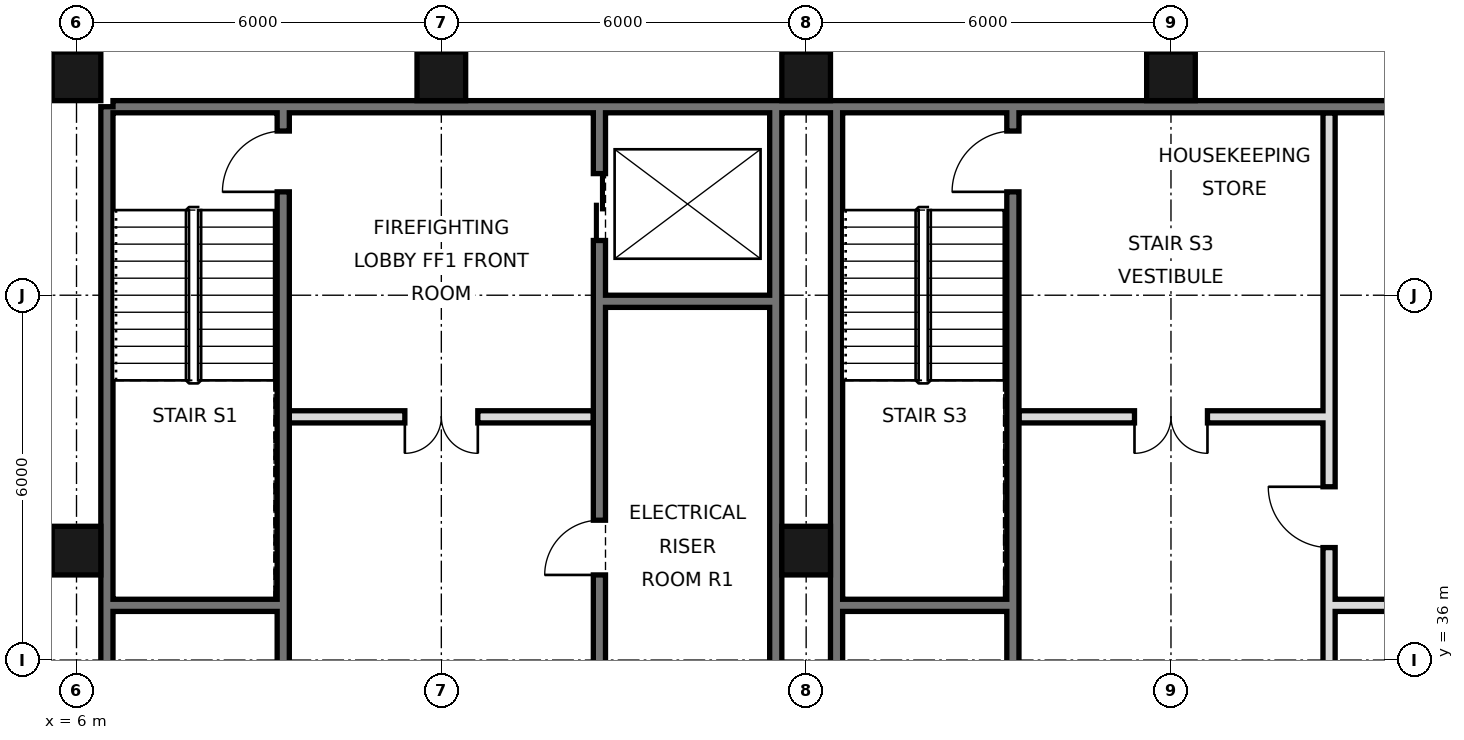
"""IFC4 building model, lengths in metres.
Left out: names, types, materials, properties, quantities, classifications, styles, units other than length and angle.
Written with IfcOpenShell. Run it as: python <this file> out.ifc"""

import sys

from ifc_helpers import new_model, si_unit, direction, frame, frame_2d, origin, origin_2d, place, context, subcontext, project, spatial, rectangle, hollow_rectangle, extrude, element, fill, save


model = new_model("IFC4")
c1 = context("Model", 3, precision=1e-05, world=origin(), true_north=direction((0.0, 1.0)))
c2 = subcontext(c1, "Body", "Model", "MODEL_VIEW")
j1 = project(units=[si_unit("LENGTHUNIT", "METRE"), si_unit("PLANEANGLEUNIT", "RADIAN")], contexts=[c1])
p1 = place(None, origin())
s1 = spatial("IfcSite", under=j1, at=p1, CompositionType="ELEMENT")
p2 = place(p1, origin())
s2 = spatial("IfcBuilding", under=s1, at=p2, CompositionType="ELEMENT")
p3 = place(p2, frame((0.0, 0.0, 319.6)))
s3 = spatial("IfcBuildingStorey", under=s2, at=p3, CompositionType="ELEMENT", Elevation=319.6)
for number, where, z_axis, x_axis in (
    (1, (6.0, 37.8, 0.0), (0.0, 0.0, 1.0), (1.0, 0.0, 0.0)),
    (2, (6.0, 45.6, 0.0), (0.0, 0.0, 1.0), (1.0, 0.0, 0.0)),
    (3, (12.0, 45.6, 0.0), (0.0, 0.0, 1.0), (1.0, 0.0, 0.0)),
    (4, (18.0, 37.8, 0.0), (0.0, 0.0, 1.0), (1.0, 0.0, 0.0)),
    (5, (18.0, 45.6, 0.0), (0.0, 0.0, 1.0), (1.0, 0.0, 0.0)),
    (6, (24.0, 45.6, 0.0), (0.0, 0.0, 1.0), (1.0, 0.0, 0.0)),
):
    element("IfcColumn", number, at=place(p3, frame(where, z_axis=z_axis, x_axis=x_axis)), inside=s3, PredefinedType="COLUMN", context=c2, shape_type="SweptSolid", body=[
        extrude(hollow_rectangle(XDim=0.8, YDim=0.8, WallThickness=0.025, at=origin_2d()), origin(), (0.0, 0.0, 1.0), 3.6),
    ])
p4 = place(p3, frame((6.5, 21.6, 0.0), z_axis=(0.0, 0.0, 1.0), x_axis=(0.0, 1.0, 0.0)))
e7 = element("IfcWall", 7, at=p4, inside=s3, PredefinedType="SOLIDWALL", context=c2, shape_type="SweptSolid", body=[
    extrude(rectangle(XDim=23.5, YDim=0.2, at=frame_2d((11.75, 0.0))), origin(), (0.0, 0.0, 1.0), 3.42),
])
p5 = place(p3, frame((6.6, 45.1, 0.0), z_axis=(0.0, 0.0, 1.0), x_axis=(1.0, 0.0, 0.0)))
e8 = element("IfcWall", 8, at=p5, inside=s3, PredefinedType="SOLIDWALL", context=c2, shape_type="SweptSolid", body=[
    extrude(rectangle(XDim=34.8, YDim=0.2, at=frame_2d((17.4, 0.0))), origin(), (0.0, 0.0, 1.0), 3.42),
])
for number, where, z_axis, x_axis in (
    (9, (17.5, 27.6, 0.0), (0.0, 0.0, 1.0), (0.0, 1.0, 0.0)),
    (10, (18.5, 27.6, 0.0), (0.0, 0.0, 1.0), (0.0, 1.0, 0.0)),
):
    element("IfcWall", number, at=place(p3, frame(where, z_axis=z_axis, x_axis=x_axis)), inside=s3, PredefinedType="SOLIDWALL", context=c2, shape_type="SweptSolid", body=[
        extrude(rectangle(XDim=17.5, YDim=0.2, at=frame_2d((8.75, 0.0))), origin(), (0.0, 0.0, 1.0), 3.42),
    ])
p6 = place(p3, frame((14.6, 27.5, 0.0), z_axis=(0.0, 0.0, 1.0), x_axis=(0.0, 1.0, 0.0)))
e11 = element("IfcWall", 11, at=p6, inside=s3, PredefinedType="SOLIDWALL", context=c2, shape_type="SweptSolid", body=[
    extrude(rectangle(XDim=17.5, YDim=0.2, at=frame_2d((8.75, 0.0))), origin(), (0.0, 0.0, 1.0), 3.42),
])
p7 = place(p6, frame((15.4, 0.0, 0.0)))
e12 = element("IfcOpeningElement", 12, at=p7, cuts=e11, PredefinedType="OPENING", context=c2, shape_type="SweptSolid", body=[
    extrude(rectangle(XDim=1.1, YDim=2.1, at=frame_2d((0.55, 1.05))), frame((0.0, 0.11, 0.0), z_axis=(0.0, -1.0, 0.0), x_axis=(1.0, 0.0, 0.0)), (0.0, 0.0, 1.0), 0.22),
])
p8 = place(p6, frame((2.7, 0.0, 0.0)))
e13 = element("IfcOpeningElement", 13, at=p8, cuts=e11, PredefinedType="OPENING", context=c2, shape_type="SweptSolid", body=[
    extrude(rectangle(XDim=1.0, YDim=2.1, at=frame_2d((0.5, 1.05))), frame((0.0, 0.11, 0.0), z_axis=(0.0, -1.0, 0.0), x_axis=(1.0, 0.0, 0.0)), (0.0, 0.0, 1.0), 0.22),
])
p9 = place(p6, frame((9.9, 0.0, 0.0)))
e14 = element("IfcOpeningElement", 14, at=p9, cuts=e11, PredefinedType="OPENING", context=c2, shape_type="SweptSolid", body=[
    extrude(rectangle(XDim=0.9, YDim=2.1, at=frame_2d((0.45, 1.05))), frame((0.0, 0.11, 0.0), z_axis=(0.0, -1.0, 0.0), x_axis=(1.0, 0.0, 0.0)), (0.0, 0.0, 1.0), 0.22),
])
p10 = place(p3, frame((21.4, 27.5, 0.0), z_axis=(0.0, 0.0, 1.0), x_axis=(0.0, 1.0, 0.0)))
e15 = element("IfcWall", 15, at=p10, inside=s3, PredefinedType="SOLIDWALL", context=c2, shape_type="SweptSolid", body=[
    extrude(rectangle(XDim=17.5, YDim=0.2, at=frame_2d((8.75, 0.0))), origin(), (0.0, 0.0, 1.0), 3.42),
])
p11 = place(p10, frame((0.6, 0.0, 0.0)))
e16 = element("IfcOpeningElement", 16, at=p11, cuts=e15, PredefinedType="OPENING", context=c2, shape_type="SweptSolid", body=[
    extrude(rectangle(XDim=1.0, YDim=2.1, at=frame_2d((0.5, 1.05))), frame((0.0, 0.11, 0.0), z_axis=(0.0, -1.0, 0.0), x_axis=(1.0, 0.0, 0.0)), (0.0, 0.0, 1.0), 0.22),
])
p12 = place(p10, frame((3.7, 0.0, 0.0)))
e17 = element("IfcOpeningElement", 17, at=p12, cuts=e15, PredefinedType="OPENING", context=c2, shape_type="SweptSolid", body=[
    extrude(rectangle(XDim=1.0, YDim=2.1, at=frame_2d((0.5, 1.05))), frame((0.0, 0.11, 0.0), z_axis=(0.0, -1.0, 0.0), x_axis=(1.0, 0.0, 0.0)), (0.0, 0.0, 1.0), 0.22),
])
p13 = place(p10, frame((16.2, 0.0, 0.0)))
e18 = element("IfcOpeningElement", 18, at=p13, cuts=e15, PredefinedType="OPENING", context=c2, shape_type="SweptSolid", body=[
    extrude(rectangle(XDim=1.0, YDim=2.1, at=frame_2d((0.5, 1.05))), frame((0.0, 0.11, 0.0), z_axis=(0.0, -1.0, 0.0), x_axis=(1.0, 0.0, 0.0)), (0.0, 0.0, 1.0), 0.22),
])
p14 = place(p10, frame((7.4, 0.0, 0.0)))
e19 = element("IfcOpeningElement", 19, at=p14, cuts=e15, PredefinedType="OPENING", context=c2, shape_type="SweptSolid", body=[
    extrude(rectangle(XDim=0.9, YDim=2.1, at=frame_2d((0.45, 1.05))), frame((0.0, 0.11, 0.0), z_axis=(0.0, -1.0, 0.0), x_axis=(1.0, 0.0, 0.0)), (0.0, 0.0, 1.0), 0.22),
])
p15 = place(p3, frame((26.6, 27.5, 0.0), z_axis=(0.0, 0.0, 1.0), x_axis=(0.0, 1.0, 0.0)))
e20 = element("IfcWall", 20, at=p15, inside=s3, PredefinedType="SOLIDWALL", context=c2, shape_type="SweptSolid", body=[
    extrude(rectangle(XDim=17.5, YDim=0.2, at=frame_2d((8.75, 0.0))), origin(), (0.0, 0.0, 1.0), 3.42),
])
p16 = place(p15, frame((4.3, 0.0, 0.0)))
e21 = element("IfcOpeningElement", 21, at=p16, cuts=e20, PredefinedType="OPENING", context=c2, shape_type="SweptSolid", body=[
    extrude(rectangle(XDim=0.9, YDim=2.1, at=frame_2d((0.45, 1.05))), frame((0.0, 0.11, 0.0), z_axis=(0.0, -1.0, 0.0), x_axis=(1.0, 0.0, 0.0)), (0.0, 0.0, 1.0), 0.22),
])
p17 = place(p15, frame((10.35, 0.0, 0.0)))
e22 = element("IfcOpeningElement", 22, at=p17, cuts=e20, PredefinedType="OPENING", context=c2, shape_type="SweptSolid", body=[
    extrude(rectangle(XDim=1.0, YDim=2.1, at=frame_2d((0.5, 1.05))), frame((0.0, 0.11, 0.0), z_axis=(0.0, -1.0, 0.0), x_axis=(1.0, 0.0, 0.0)), (0.0, 0.0, 1.0), 0.22),
])
p18 = place(p3, frame((9.4, 21.6, 0.0), z_axis=(0.0, 0.0, 1.0), x_axis=(0.0, 1.0, 0.0)))
e23 = element("IfcWall", 23, at=p18, inside=s3, PredefinedType="SOLIDWALL", context=c2, shape_type="SweptSolid", body=[
    extrude(rectangle(XDim=23.4, YDim=0.2, at=frame_2d((11.7, 0.0))), origin(), (0.0, 0.0, 1.0), 3.42),
])
p19 = place(p18, frame((7.95, 0.0, 0.0)))
e24 = element("IfcOpeningElement", 24, at=p19, cuts=e23, PredefinedType="OPENING", context=c2, shape_type="SweptSolid", body=[
    extrude(rectangle(XDim=1.0, YDim=2.1, at=frame_2d((0.5, 1.05))), frame((0.0, 0.11, 0.0), z_axis=(0.0, -1.0, 0.0), x_axis=(1.0, 0.0, 0.0)), (0.0, 0.0, 1.0), 0.22),
])
p20 = place(p18, frame((12.6, 0.0, 0.0)))
e25 = element("IfcOpeningElement", 25, at=p20, cuts=e23, PredefinedType="OPENING", context=c2, shape_type="SweptSolid", body=[
    extrude(rectangle(XDim=1.0, YDim=2.1, at=frame_2d((0.5, 1.05))), frame((0.0, 0.11, 0.0), z_axis=(0.0, -1.0, 0.0), x_axis=(1.0, 0.0, 0.0)), (0.0, 0.0, 1.0), 0.22),
])
p21 = place(p18, frame((22.1, 0.0, 0.0)))
e26 = element("IfcOpeningElement", 26, at=p21, cuts=e23, PredefinedType="OPENING", context=c2, shape_type="SweptSolid", body=[
    extrude(rectangle(XDim=1.0, YDim=2.1, at=frame_2d((0.5, 1.05))), frame((0.0, 0.11, 0.0), z_axis=(0.0, -1.0, 0.0), x_axis=(1.0, 0.0, 0.0)), (0.0, 0.0, 1.0), 0.22),
])
p22 = place(p18, frame((0.175, 0.0, 0.0)))
e27 = element("IfcOpeningElement", 27, at=p22, cuts=e23, PredefinedType="OPENING", context=c2, shape_type="SweptSolid", body=[
    extrude(rectangle(XDim=0.9, YDim=2.1, at=frame_2d((0.45, 1.05))), frame((0.0, 0.11, 0.0), z_axis=(0.0, -1.0, 0.0), x_axis=(1.0, 0.0, 0.0)), (0.0, 0.0, 1.0), 0.22),
])
for number, where, z_axis, x_axis in (
    (28, (18.6, 36.9, 0.0), (0.0, 0.0, 1.0), (1.0, 0.0, 0.0)),
    (29, (26.7, 36.9, 0.0), (0.0, 0.0, 1.0), (1.0, 0.0, 0.0)),
    (30, (6.6, 36.9, 0.0), (0.0, 0.0, 1.0), (1.0, 0.0, 0.0)),
):
    element("IfcWall", number, at=place(p3, frame(where, z_axis=z_axis, x_axis=x_axis)), inside=s3, PredefinedType="SOLIDWALL", context=c2, shape_type="SweptSolid", body=[
        extrude(rectangle(XDim=2.7, YDim=0.2, at=frame_2d((1.35, 0.0))), origin(), (0.0, 0.0, 1.0), 3.42),
    ])
p23 = place(p3, frame((21.5, 40.0, 0.0), z_axis=(0.0, 0.0, 1.0), x_axis=(1.0, 0.0, 0.0)))
e31 = element("IfcWall", 31, at=p23, inside=s3, PredefinedType="PARTITIONING", context=c2, shape_type="SweptSolid", body=[
    extrude(rectangle(XDim=5.0, YDim=0.2, at=frame_2d((2.5, 0.0))), origin(), (0.0, 0.0, 1.0), 3.42),
])
p24 = place(p23, frame((1.9, 0.0, 0.0)))
e32 = element("IfcOpeningElement", 32, at=p24, cuts=e31, PredefinedType="OPENING", context=c2, shape_type="SweptSolid", body=[
    extrude(rectangle(XDim=1.2, YDim=2.1, at=frame_2d((0.6, 1.05))), frame((0.0, 0.11, 0.0), z_axis=(0.0, -1.0, 0.0), x_axis=(1.0, 0.0, 0.0)), (0.0, 0.0, 1.0), 0.22),
])
p25 = place(p3, frame((9.5, 40.0, 0.0), z_axis=(0.0, 0.0, 1.0), x_axis=(1.0, 0.0, 0.0)))
e33 = element("IfcWall", 33, at=p25, inside=s3, PredefinedType="PARTITIONING", context=c2, shape_type="SweptSolid", body=[
    extrude(rectangle(XDim=5.0, YDim=0.2, at=frame_2d((2.5, 0.0))), origin(), (0.0, 0.0, 1.0), 3.42),
])
p26 = place(p25, frame((1.9, 0.0, 0.0)))
e34 = element("IfcOpeningElement", 34, at=p26, cuts=e33, PredefinedType="OPENING", context=c2, shape_type="SweptSolid", body=[
    extrude(rectangle(XDim=1.2, YDim=2.1, at=frame_2d((0.6, 1.05))), frame((0.0, 0.11, 0.0), z_axis=(0.0, -1.0, 0.0), x_axis=(1.0, 0.0, 0.0)), (0.0, 0.0, 1.0), 0.22),
])
p27 = place(p3, frame((14.7, 41.9, 0.0), z_axis=(0.0, 0.0, 1.0), x_axis=(1.0, 0.0, 0.0)))
e35 = element("IfcWall", 35, at=p27, inside=s3, PredefinedType="SOLIDWALL", context=c2, shape_type="SweptSolid", body=[
    extrude(rectangle(XDim=2.7, YDim=0.2, at=frame_2d((1.35, 0.0))), origin(), (0.0, 0.0, 1.0), 3.42),
])
p28 = place(p26, frame((1.2, 0.0, 0.0), z_axis=(0.0, 0.0, 1.0), x_axis=(-1.0, 0.0, 0.0)))
e36 = element("IfcDoor", 36, at=p28, inside=s3, OperationType="DOUBLE_DOOR_SINGLE_SWING", PredefinedType="DOOR", context=c2, shape_type="SweptSolid", body=[
    extrude(rectangle(XDim=1.2, YDim=2.1, at=frame_2d((0.6, 1.05))), frame((0.0, 0.025, 0.0), z_axis=(0.0, -1.0, 0.0), x_axis=(1.0, 0.0, 0.0)), (0.0, 0.0, 1.0), 0.05),
])
fill(e34, e36)
p29 = place(p24, frame((1.2, 0.0, 0.0), z_axis=(0.0, 0.0, 1.0), x_axis=(-1.0, 0.0, 0.0)))
e37 = element("IfcDoor", 37, at=p29, inside=s3, OperationType="DOUBLE_DOOR_SINGLE_SWING", PredefinedType="DOOR", context=c2, shape_type="SweptSolid", body=[
    extrude(rectangle(XDim=1.2, YDim=2.1, at=frame_2d((0.6, 1.05))), frame((0.0, 0.025, 0.0), z_axis=(0.0, -1.0, 0.0), x_axis=(1.0, 0.0, 0.0)), (0.0, 0.0, 1.0), 0.05),
])
fill(e32, e37)
p30 = place(p7, origin())
e38 = element("IfcDoor", 38, at=p30, inside=s3, OperationType="DOUBLE_DOOR_SLIDING", PredefinedType="DOOR", context=c2, shape_type="SweptSolid", body=[
    extrude(rectangle(XDim=1.1, YDim=2.1, at=frame_2d((0.55, 1.05))), frame((0.0, 0.025, 0.0), z_axis=(0.0, -1.0, 0.0), x_axis=(1.0, 0.0, 0.0)), (0.0, 0.0, 1.0), 0.05),
])
fill(e12, e38)
p31 = place(p21, origin())
e39 = element("IfcDoor", 39, at=p31, inside=s3, OperationType="SINGLE_SWING_LEFT", PredefinedType="DOOR", context=c2, shape_type="SweptSolid", body=[
    extrude(rectangle(XDim=1.0, YDim=2.1, at=frame_2d((0.5, 1.05))), frame((0.0, 0.025, 0.0), z_axis=(0.0, -1.0, 0.0), x_axis=(1.0, 0.0, 0.0)), (0.0, 0.0, 1.0), 0.05),
])
fill(e26, e39)
p32 = place(p13, origin())
e40 = element("IfcDoor", 40, at=p32, inside=s3, OperationType="SINGLE_SWING_LEFT", PredefinedType="DOOR", context=c2, shape_type="SweptSolid", body=[
    extrude(rectangle(XDim=1.0, YDim=2.1, at=frame_2d((0.5, 1.05))), frame((0.0, 0.025, 0.0), z_axis=(0.0, -1.0, 0.0), x_axis=(1.0, 0.0, 0.0)), (0.0, 0.0, 1.0), 0.05),
])
fill(e18, e40)
p33 = place(p9, origin())
e41 = element("IfcDoor", 41, at=p33, inside=s3, OperationType="SINGLE_SWING_LEFT", PredefinedType="DOOR", context=c2, shape_type="SweptSolid", body=[
    extrude(rectangle(XDim=0.9, YDim=2.1, at=frame_2d((0.45, 1.05))), frame((0.0, 0.025, 0.0), z_axis=(0.0, -1.0, 0.0), x_axis=(1.0, 0.0, 0.0)), (0.0, 0.0, 1.0), 0.05),
])
fill(e14, e41)
p34 = place(p17, frame((1.0, 0.0, 0.0), z_axis=(0.0, 0.0, 1.0), x_axis=(-1.0, 0.0, 0.0)))
e42 = element("IfcDoor", 42, at=p34, inside=s3, OperationType="SINGLE_SWING_LEFT", PredefinedType="DOOR", context=c2, shape_type="SweptSolid", body=[
    extrude(rectangle(XDim=1.0, YDim=2.1, at=frame_2d((0.5, 1.05))), frame((0.0, 0.025, 0.0), z_axis=(0.0, -1.0, 0.0), x_axis=(1.0, 0.0, 0.0)), (0.0, 0.0, 1.0), 0.05),
])
fill(e22, e42)
save(model, sys.argv[1])
